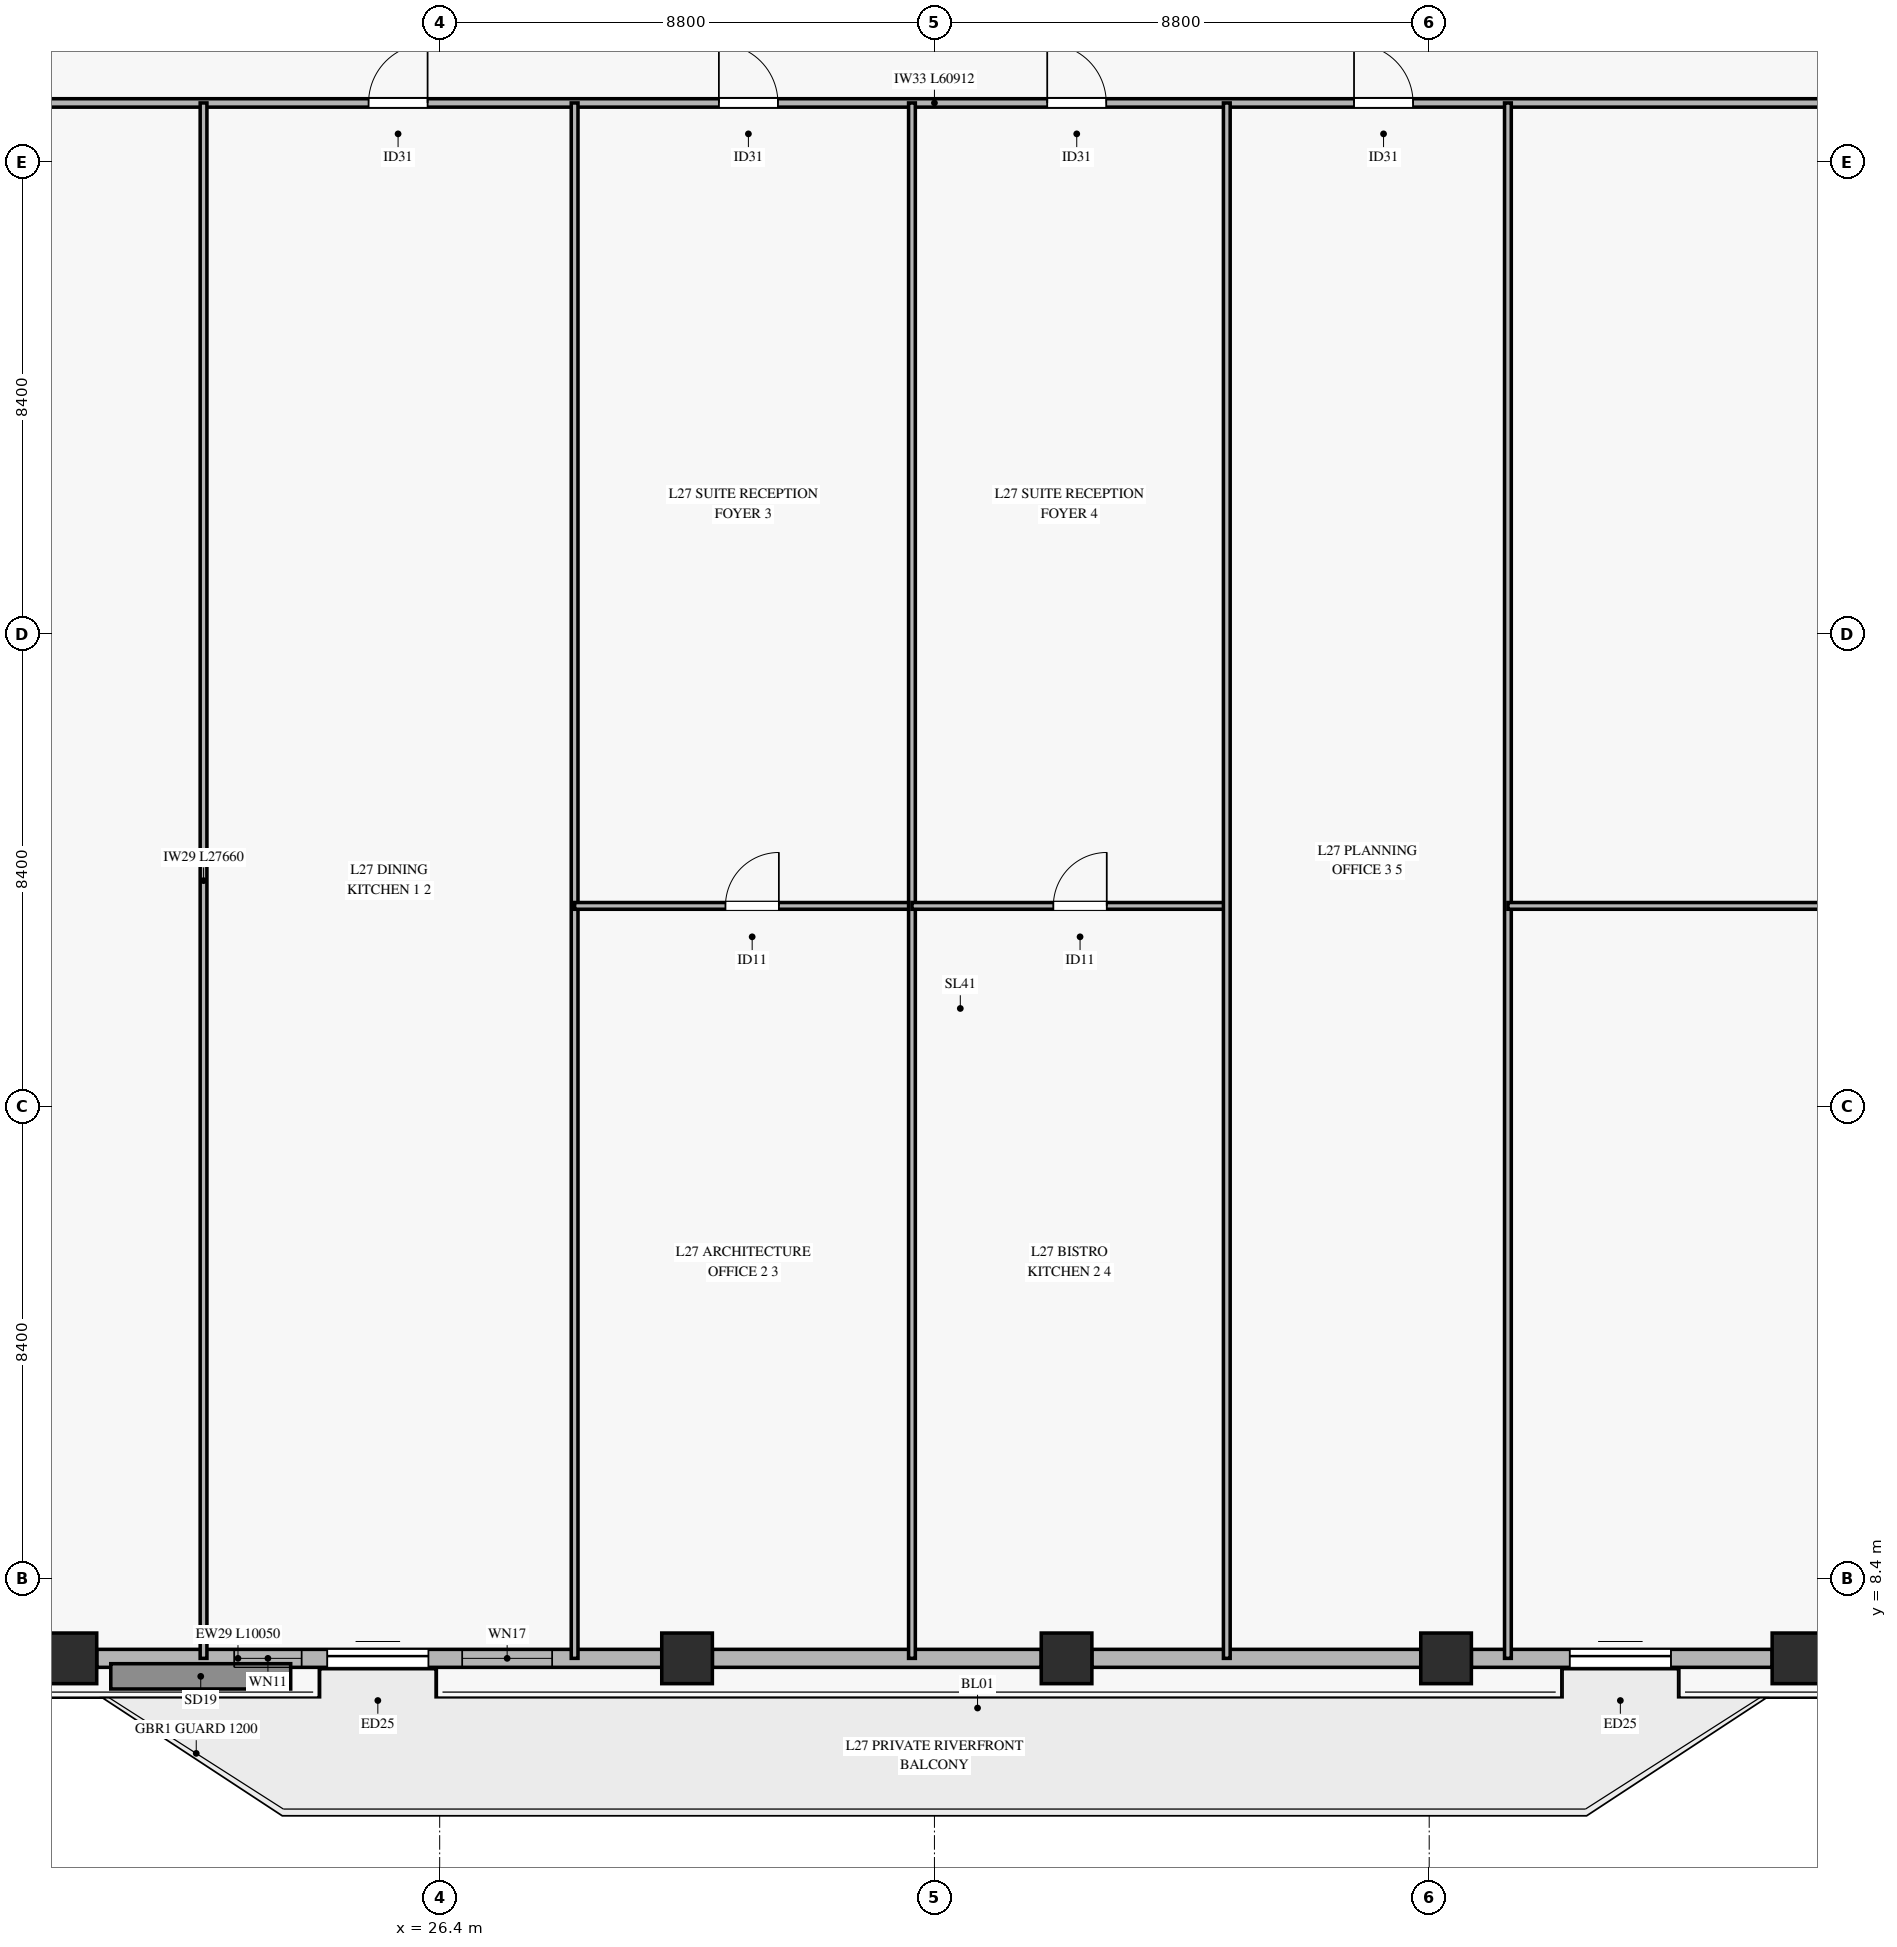
"""IFC4 building model, lengths in metres.
Left out: names, types, materials, properties, quantities, classifications, styles, units other than length and angle.
Written with IfcOpenShell. Run it as: python <this file> out.ifc"""

import sys

from ifc_helpers import new_model, si_unit, direction, frame, frame_2d, origin, origin_2d, place, context, subcontext, project, spatial, rectangle, hollow_rectangle, extrude, source, transform, mapped, element, fill, save


model = new_model("IFC4")
c1 = context("Model", 3, precision=1e-05, world=origin(), true_north=direction((0.0, 1.0)))
c2 = subcontext(c1, "Body", "Model", "MODEL_VIEW")
j1 = project(units=[si_unit("LENGTHUNIT", "METRE"), si_unit("PLANEANGLEUNIT", "RADIAN")], contexts=[c1])
p1 = place(None, origin())
s1 = spatial("IfcSite", under=j1, at=p1, CompositionType="ELEMENT")
p2 = place(p1, origin())
s2 = spatial("IfcBuilding", under=s1, at=p2, CompositionType="ELEMENT")
p3 = place(p2, frame((0.0, 0.0, 111.4)))
s3 = spatial("IfcBuildingStorey", under=s2, at=p3, CompositionType="ELEMENT", Elevation=111.4)
m1 = source(origin(), c2, "Body", "SweptSolid", [
    extrude(hollow_rectangle(XDim=0.9, YDim=0.9, WallThickness=0.04, at=origin_2d()), origin(), (0.0, 0.0, 1.0), 3.68),
])
for number, where, z_axis, x_axis in (
    (1, (19.85, 6.99, 0.0), (0.0, 0.0, 1.0), (1.0, 0.0, 0.0)),
    (2, (30.8, 6.99, 0.0), (0.0, 0.0, 1.0), (1.0, 0.0, 0.0)),
    (3, (37.55, 6.99, 0.0), (0.0, 0.0, 1.0), (1.0, 0.0, 0.0)),
    (4, (44.3, 6.99, 0.0), (0.0, 0.0, 1.0), (1.0, 0.0, 0.0)),
    (5, (50.55, 6.99, 0.0), (0.0, 0.0, 1.0), (1.0, 0.0, 0.0)),
):
    element("IfcColumn", number, at=place(p3, frame(where, z_axis=z_axis, x_axis=x_axis)), inside=s3, PredefinedType="COLUMN", context=c2, shape_type="MappedRepresentation", body=[
        mapped(m1, transform((0.0, 0.0, 0.0), x_axis=(1.0, 0.0, 0.0), y_axis=(0.0, 1.0, 0.0), z_axis=(0.0, 0.0, 1.0), scale=1.0)),
    ])
p4 = place(p3, frame((20.3, 6.99, 0.0), z_axis=(0.0, 0.0, 1.0), x_axis=(1.0, 0.0, 0.0)))
e6 = element("IfcWall", 6, at=p4, inside=s3, PredefinedType="SOLIDWALL", context=c2, shape_type="SweptSolid", body=[
    extrude(rectangle(XDim=10.05, YDim=0.32, at=frame_2d((5.025, 0.0))), origin(), (0.0, 0.0, 1.0), 3.16),
])
p5 = place(p4, frame((4.1, 0.0, 0.0)))
e7 = element("IfcOpeningElement", 7, at=p5, cuts=e6, PredefinedType="OPENING", context=c2, shape_type="SweptSolid", body=[
    extrude(rectangle(XDim=1.8, YDim=2.25, at=frame_2d((0.9, 1.125))), frame((0.0, 0.17, 0.0), z_axis=(0.0, -1.0, 0.0), x_axis=(1.0, 0.0, 0.0)), (0.0, 0.0, 1.0), 0.34),
])
p6 = place(p4, frame((2.445, 0.0, 0.45)))
e8 = element("IfcOpeningElement", 8, at=p6, cuts=e6, PredefinedType="OPENING", context=c2, shape_type="SweptSolid", body=[
    extrude(rectangle(XDim=1.2, YDim=2.0, at=frame_2d((0.6, 1.0))), frame((0.0, 0.17, 0.0), z_axis=(0.0, -1.0, 0.0), x_axis=(1.0, 0.0, 0.0)), (0.0, 0.0, 1.0), 0.34),
])
p7 = place(p4, frame((6.5, 0.0, 0.45)))
e9 = element("IfcOpeningElement", 9, at=p7, cuts=e6, PredefinedType="OPENING", context=c2, shape_type="SweptSolid", body=[
    extrude(rectangle(XDim=1.6, YDim=2.0, at=frame_2d((0.8, 1.0))), frame((0.0, 0.17, 0.0), z_axis=(0.0, -1.0, 0.0), x_axis=(1.0, 0.0, 0.0)), (0.0, 0.0, 1.0), 0.34),
])
for number, where, z_axis, x_axis in (
    (10, (31.25, 6.99, 0.0), (0.0, 0.0, 1.0), (1.0, 0.0, 0.0)),
    (11, (38.0, 6.99, 0.0), (0.0, 0.0, 1.0), (1.0, 0.0, 0.0)),
):
    element("IfcWall", number, at=place(p3, frame(where, z_axis=z_axis, x_axis=x_axis)), inside=s3, PredefinedType="SOLIDWALL", context=c2, shape_type="SweptSolid", body=[
        extrude(rectangle(XDim=5.85, YDim=0.32, at=frame_2d((2.925, 0.0))), origin(), (0.0, 0.0, 1.0), 3.16),
    ])
p8 = place(p3, frame((44.75, 6.99, 0.0), z_axis=(0.0, 0.0, 1.0), x_axis=(1.0, 0.0, 0.0)))
e12 = element("IfcWall", 12, at=p8, inside=s3, PredefinedType="SOLIDWALL", context=c2, shape_type="SweptSolid", body=[
    extrude(rectangle(XDim=5.35, YDim=0.32, at=frame_2d((2.675, 0.0))), origin(), (0.0, 0.0, 1.0), 3.16),
])
p9 = place(p8, frame((1.75, 0.0, 0.0)))
e13 = element("IfcOpeningElement", 13, at=p9, cuts=e12, PredefinedType="OPENING", context=c2, shape_type="SweptSolid", body=[
    extrude(rectangle(XDim=1.8, YDim=2.25, at=frame_2d((0.9, 1.125))), frame((0.0, 0.17, 0.0), z_axis=(0.0, -1.0, 0.0), x_axis=(1.0, 0.0, 0.0)), (0.0, 0.0, 1.0), 0.34),
])
p10 = place(p3, frame((4.744, 34.65, 0.0), z_axis=(0.0, 0.0, 1.0), x_axis=(1.0, 0.0, 0.0)))
e14 = element("IfcWall", 14, at=p10, inside=s3, PredefinedType="PARTITIONING", context=c2, shape_type="SweptSolid", body=[
    extrude(rectangle(XDim=60.912, YDim=0.15, at=frame_2d((30.456, 0.0))), origin(), (0.0, 0.0, 1.0), 2.765),
])
p11 = place(p10, frame((7.61, 0.0, 0.0)))
e15 = element("IfcOpeningElement", 15, at=p11, cuts=e14, PredefinedType="OPENING", context=c2, shape_type="SweptSolid", body=[
    extrude(rectangle(XDim=1.05, YDim=2.15, at=frame_2d((0.525, 1.075))), frame((0.0, 0.085, 0.0), z_axis=(0.0, -1.0, 0.0), x_axis=(1.0, 0.0, 0.0)), (0.0, 0.0, 1.0), 0.17),
])
p12 = place(p10, frame((20.391, 0.0, 0.0)))
e16 = element("IfcOpeningElement", 16, at=p12, cuts=e14, PredefinedType="OPENING", context=c2, shape_type="SweptSolid", body=[
    extrude(rectangle(XDim=1.05, YDim=2.15, at=frame_2d((0.525, 1.075))), frame((0.0, 0.085, 0.0), z_axis=(0.0, -1.0, 0.0), x_axis=(1.0, 0.0, 0.0)), (0.0, 0.0, 1.0), 0.17),
])
p13 = place(p10, frame((26.622, 0.0, 0.0)))
e17 = element("IfcOpeningElement", 17, at=p13, cuts=e14, PredefinedType="OPENING", context=c2, shape_type="SweptSolid", body=[
    extrude(rectangle(XDim=1.05, YDim=2.15, at=frame_2d((0.525, 1.075))), frame((0.0, 0.085, 0.0), z_axis=(0.0, -1.0, 0.0), x_axis=(1.0, 0.0, 0.0)), (0.0, 0.0, 1.0), 0.17),
])
p14 = place(p10, frame((32.462, 0.0, 0.0)))
e18 = element("IfcOpeningElement", 18, at=p14, cuts=e14, PredefinedType="OPENING", context=c2, shape_type="SweptSolid", body=[
    extrude(rectangle(XDim=1.05, YDim=2.15, at=frame_2d((0.525, 1.075))), frame((0.0, 0.085, 0.0), z_axis=(0.0, -1.0, 0.0), x_axis=(1.0, 0.0, 0.0)), (0.0, 0.0, 1.0), 0.17),
])
p15 = place(p10, frame((37.919, 0.0, 0.0)))
e19 = element("IfcOpeningElement", 19, at=p15, cuts=e14, PredefinedType="OPENING", context=c2, shape_type="SweptSolid", body=[
    extrude(rectangle(XDim=1.05, YDim=2.15, at=frame_2d((0.525, 1.075))), frame((0.0, 0.085, 0.0), z_axis=(0.0, -1.0, 0.0), x_axis=(1.0, 0.0, 0.0)), (0.0, 0.0, 1.0), 0.17),
])
p16 = place(p10, frame((48.844, 0.0, 0.0)))
e20 = element("IfcOpeningElement", 20, at=p16, cuts=e14, PredefinedType="OPENING", context=c2, shape_type="SweptSolid", body=[
    extrude(rectangle(XDim=1.05, YDim=2.15, at=frame_2d((0.525, 1.075))), frame((0.0, 0.085, 0.0), z_axis=(0.0, -1.0, 0.0), x_axis=(1.0, 0.0, 0.0)), (0.0, 0.0, 1.0), 0.17),
])
for number, where, z_axis, x_axis in (
    (21, (22.2, 6.99, 0.0), (0.0, 0.0, 1.0), (0.0, 1.0, 0.0)),
    (22, (28.8, 6.99, 0.0), (0.0, 0.0, 1.0), (0.0, 1.0, 0.0)),
):
    element("IfcWall", number, at=place(p3, frame(where, z_axis=z_axis, x_axis=x_axis)), inside=s3, PredefinedType="PARTITIONING", context=c2, shape_type="SweptSolid", body=[
        extrude(rectangle(XDim=27.66, YDim=0.12, at=frame_2d((13.83, 0.0))), origin(), (0.0, 0.0, 1.0), 3.165),
    ])
p17 = place(p3, frame((28.8, 20.371, 0.0), z_axis=(0.0, 0.0, 1.0), x_axis=(1.0, 0.0, 0.0)))
e23 = element("IfcWall", 23, at=p17, inside=s3, PredefinedType="PARTITIONING", context=c2, shape_type="SweptSolid", body=[
    extrude(rectangle(XDim=6.0, YDim=0.12, at=frame_2d((3.0, 0.0))), origin(), (0.0, 0.0, 1.0), 2.765),
])
p18 = place(p17, frame((2.683, 0.0, 0.0)))
e24 = element("IfcOpeningElement", 24, at=p18, cuts=e23, PredefinedType="OPENING", context=c2, shape_type="SweptSolid", body=[
    extrude(rectangle(XDim=0.95, YDim=2.1, at=frame_2d((0.475, 1.05))), frame((0.0, 0.07, 0.0), z_axis=(0.0, -1.0, 0.0), x_axis=(1.0, 0.0, 0.0)), (0.0, 0.0, 1.0), 0.14),
])
p19 = place(p3, frame((34.8, 6.99, 0.0), z_axis=(0.0, 0.0, 1.0), x_axis=(0.0, 1.0, 0.0)))
e25 = element("IfcWall", 25, at=p19, inside=s3, PredefinedType="PARTITIONING", context=c2, shape_type="SweptSolid", body=[
    extrude(rectangle(XDim=27.66, YDim=0.12, at=frame_2d((13.83, 0.0))), origin(), (0.0, 0.0, 1.0), 3.165),
])
p20 = place(p3, frame((34.8, 20.371, 0.0), z_axis=(0.0, 0.0, 1.0), x_axis=(1.0, 0.0, 0.0)))
e26 = element("IfcWall", 26, at=p20, inside=s3, PredefinedType="PARTITIONING", context=c2, shape_type="SweptSolid", body=[
    extrude(rectangle(XDim=5.6, YDim=0.12, at=frame_2d((2.8, 0.0))), origin(), (0.0, 0.0, 1.0), 2.765),
])
p21 = place(p20, frame((2.515, 0.0, 0.0)))
e27 = element("IfcOpeningElement", 27, at=p21, cuts=e26, PredefinedType="OPENING", context=c2, shape_type="SweptSolid", body=[
    extrude(rectangle(XDim=0.95, YDim=2.1, at=frame_2d((0.475, 1.05))), frame((0.0, 0.07, 0.0), z_axis=(0.0, -1.0, 0.0), x_axis=(1.0, 0.0, 0.0)), (0.0, 0.0, 1.0), 0.14),
])
for number, where, z_axis, x_axis in (
    (28, (40.4, 6.99, 0.0), (0.0, 0.0, 1.0), (0.0, 1.0, 0.0)),
    (29, (45.4, 6.99, 0.0), (0.0, 0.0, 1.0), (0.0, 1.0, 0.0)),
):
    element("IfcWall", number, at=place(p3, frame(where, z_axis=z_axis, x_axis=x_axis)), inside=s3, PredefinedType="PARTITIONING", context=c2, shape_type="SweptSolid", body=[
        extrude(rectangle(XDim=27.66, YDim=0.12, at=frame_2d((13.83, 0.0))), origin(), (0.0, 0.0, 1.0), 3.165),
    ])
p22 = place(p3, frame((45.4, 20.371, 0.0), z_axis=(0.0, 0.0, 1.0), x_axis=(1.0, 0.0, 0.0)))
e30 = element("IfcWall", 30, at=p22, inside=s3, PredefinedType="PARTITIONING", context=c2, shape_type="SweptSolid", body=[
    extrude(rectangle(XDim=20.256, YDim=0.12, at=frame_2d((10.128, 0.0))), origin(), (0.0, 0.0, 1.0), 2.765),
])
p23 = place(p22, frame((8.586, 0.0, 0.0)))
e31 = element("IfcOpeningElement", 31, at=p23, cuts=e30, PredefinedType="OPENING", context=c2, shape_type="SweptSolid", body=[
    extrude(rectangle(XDim=0.95, YDim=2.1, at=frame_2d((0.475, 1.05))), frame((0.0, 0.07, 0.0), z_axis=(0.0, -1.0, 0.0), x_axis=(1.0, 0.0, 0.0)), (0.0, 0.0, 1.0), 0.14),
])
m2 = source(origin(), c2, "Body", "SweptSolid", [
    extrude(rectangle(XDim=1.8, YDim=2.25, at=frame_2d((0.9, 1.125))), frame((0.0, 0.025, 0.0), z_axis=(0.0, -1.0, 0.0), x_axis=(1.0, 0.0, 0.0)), (0.0, 0.0, 1.0), 0.05),
])
p24 = place(p5, origin())
e32 = element("IfcDoor", 32, at=p24, inside=s3, OperationType="SLIDING_TO_LEFT", PredefinedType="DOOR", context=c2, shape_type="MappedRepresentation", body=[
    mapped(m2, transform((0.0, 0.0, 0.0), x_axis=(1.0, 0.0, 0.0), y_axis=(0.0, 1.0, 0.0), z_axis=(0.0, 0.0, 1.0), scale=1.0)),
])
fill(e7, e32)
m3 = source(origin(), c2, "Body", "SweptSolid", [
    extrude(rectangle(XDim=1.2, YDim=2.0, at=frame_2d((0.6, 1.0))), frame((0.0, 0.03, 0.0), z_axis=(0.0, -1.0, 0.0), x_axis=(1.0, 0.0, 0.0)), (0.0, 0.0, 1.0), 0.06),
])
p25 = place(p6, origin())
e33 = element("IfcWindow", 33, at=p25, inside=s3, PartitioningType="SINGLE_PANEL", PredefinedType="WINDOW", context=c2, shape_type="MappedRepresentation", body=[
    mapped(m3, transform((0.0, 0.0, 0.0), x_axis=(1.0, 0.0, 0.0), y_axis=(0.0, 1.0, 0.0), z_axis=(0.0, 0.0, 1.0), scale=1.0)),
])
fill(e8, e33)
m4 = source(origin(), c2, "Body", "SweptSolid", [
    extrude(rectangle(XDim=1.6, YDim=2.0, at=frame_2d((0.8, 1.0))), frame((0.0, 0.03, 0.0), z_axis=(0.0, -1.0, 0.0), x_axis=(1.0, 0.0, 0.0)), (0.0, 0.0, 1.0), 0.06),
])
p26 = place(p7, origin())
e34 = element("IfcWindow", 34, at=p26, inside=s3, PartitioningType="SINGLE_PANEL", PredefinedType="WINDOW", context=c2, shape_type="MappedRepresentation", body=[
    mapped(m4, transform((0.0, 0.0, 0.0), x_axis=(1.0, 0.0, 0.0), y_axis=(0.0, 1.0, 0.0), z_axis=(0.0, 0.0, 1.0), scale=1.0)),
])
fill(e9, e34)
p27 = place(p9, origin())
e35 = element("IfcDoor", 35, at=p27, inside=s3, OperationType="SLIDING_TO_LEFT", PredefinedType="DOOR", context=c2, shape_type="MappedRepresentation", body=[
    mapped(m2, transform((0.0, 0.0, 0.0), x_axis=(1.0, 0.0, 0.0), y_axis=(0.0, 1.0, 0.0), z_axis=(0.0, 0.0, 1.0), scale=1.0)),
])
fill(e13, e35)
m5 = source(origin(), c2, "Body", "SweptSolid", [
    extrude(rectangle(XDim=1.05, YDim=2.15, at=frame_2d((0.525, 1.075))), frame((0.0, 0.025, 0.0), z_axis=(0.0, -1.0, 0.0), x_axis=(1.0, 0.0, 0.0)), (0.0, 0.0, 1.0), 0.05),
])
p28 = place(p12, origin())
e36 = element("IfcDoor", 36, at=p28, inside=s3, OperationType="SINGLE_SWING_RIGHT", PredefinedType="DOOR", context=c2, shape_type="MappedRepresentation", body=[
    mapped(m5, transform((0.0, 0.0, 0.0), x_axis=(1.0, 0.0, 0.0), y_axis=(0.0, 1.0, 0.0), z_axis=(0.0, 0.0, 1.0), scale=1.0)),
])
fill(e16, e36)
p29 = place(p13, origin())
e37 = element("IfcDoor", 37, at=p29, inside=s3, OperationType="SINGLE_SWING_LEFT", PredefinedType="DOOR", context=c2, shape_type="MappedRepresentation", body=[
    mapped(m5, transform((0.0, 0.0, 0.0), x_axis=(1.0, 0.0, 0.0), y_axis=(0.0, 1.0, 0.0), z_axis=(0.0, 0.0, 1.0), scale=1.0)),
])
fill(e17, e37)
m6 = source(origin(), c2, "Body", "SweptSolid", [
    extrude(rectangle(XDim=0.95, YDim=2.1, at=frame_2d((0.475, 1.05))), frame((0.0, 0.025, 0.0), z_axis=(0.0, -1.0, 0.0), x_axis=(1.0, 0.0, 0.0)), (0.0, 0.0, 1.0), 0.05),
])
p30 = place(p18, origin())
e38 = element("IfcDoor", 38, at=p30, inside=s3, OperationType="SINGLE_SWING_RIGHT", PredefinedType="DOOR", context=c2, shape_type="MappedRepresentation", body=[
    mapped(m6, transform((0.0, 0.0, 0.0), x_axis=(1.0, 0.0, 0.0), y_axis=(0.0, 1.0, 0.0), z_axis=(0.0, 0.0, 1.0), scale=1.0)),
])
fill(e24, e38)
p31 = place(p14, origin())
e39 = element("IfcDoor", 39, at=p31, inside=s3, OperationType="SINGLE_SWING_LEFT", PredefinedType="DOOR", context=c2, shape_type="MappedRepresentation", body=[
    mapped(m5, transform((0.0, 0.0, 0.0), x_axis=(1.0, 0.0, 0.0), y_axis=(0.0, 1.0, 0.0), z_axis=(0.0, 0.0, 1.0), scale=1.0)),
])
fill(e18, e39)
p32 = place(p21, origin())
e40 = element("IfcDoor", 40, at=p32, inside=s3, OperationType="SINGLE_SWING_RIGHT", PredefinedType="DOOR", context=c2, shape_type="MappedRepresentation", body=[
    mapped(m6, transform((0.0, 0.0, 0.0), x_axis=(1.0, 0.0, 0.0), y_axis=(0.0, 1.0, 0.0), z_axis=(0.0, 0.0, 1.0), scale=1.0)),
])
fill(e27, e40)
p33 = place(p15, origin())
e41 = element("IfcDoor", 41, at=p33, inside=s3, OperationType="SINGLE_SWING_LEFT", PredefinedType="DOOR", context=c2, shape_type="MappedRepresentation", body=[
    mapped(m5, transform((0.0, 0.0, 0.0), x_axis=(1.0, 0.0, 0.0), y_axis=(0.0, 1.0, 0.0), z_axis=(0.0, 0.0, 1.0), scale=1.0)),
])
fill(e19, e41)
save(model, sys.argv[1])
